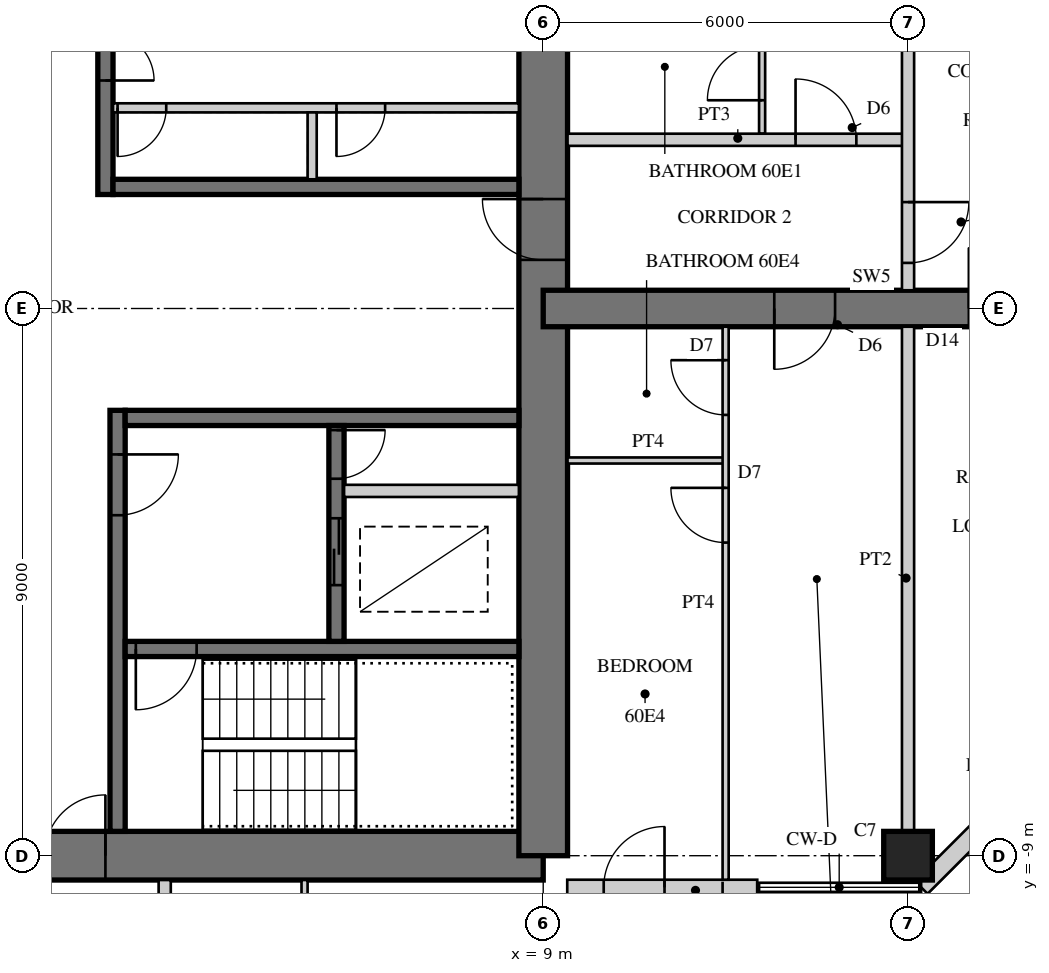
"""IFC4 building model, lengths in metres.
Left out: names, types, materials, properties, quantities, classifications, styles, units other than length and angle.
Written with IfcOpenShell. Run it as: python <this file> out.ifc"""

import sys

from ifc_helpers import new_model, si_unit, direction, frame, frame_2d, origin, origin_2d, place, context, subcontext, project, spatial, rectangle, hollow_rectangle, extrude, element, fill, save


model = new_model("IFC4")
c1 = context("Model", 3, precision=1e-05, world=origin(), true_north=direction((0.0, 1.0)))
c2 = subcontext(c1, "Body", "Model", "MODEL_VIEW")
j1 = project(units=[si_unit("LENGTHUNIT", "METRE"), si_unit("PLANEANGLEUNIT", "RADIAN")], contexts=[c1])
p1 = place(None, origin())
s1 = spatial("IfcSite", under=j1, at=p1, CompositionType="ELEMENT")
p2 = place(p1, origin())
s2 = spatial("IfcBuilding", under=s1, at=p2, CompositionType="ELEMENT")
p3 = place(p2, frame((0.0, 0.0, 235.7)))
s3 = spatial("IfcBuildingStorey", under=s2, at=p3, CompositionType="ELEMENT", Elevation=235.7)
p4 = place(p3, frame((-9.0, -9.0, 0.0), z_axis=(0.0, 0.0, 1.0), x_axis=(1.0, 0.0, 0.0)))
e1 = element("IfcWall", 1, at=p4, inside=s3, PredefinedType="SHEAR", context=c2, shape_type="SweptSolid", body=[
    extrude(rectangle(XDim=18.0, YDim=0.8, at=frame_2d((9.0, 0.0))), origin(), (0.0, 0.0, 1.0), 3.4),
])
p5 = place(p4, frame((9.8, 0.0, 0.0)))
e2 = element("IfcOpeningElement", 2, at=p5, cuts=e1, PredefinedType="OPENING", context=c2, shape_type="SweptSolid", body=[
    extrude(rectangle(XDim=1.0, YDim=2.4, at=frame_2d((0.5, 1.2))), frame((0.0, 0.41, 0.0), z_axis=(0.0, -1.0, 0.0), x_axis=(1.0, 0.0, 0.0)), (0.0, 0.0, 1.0), 0.82),
])
p6 = place(p3, frame((9.0, -9.0, 0.0), z_axis=(0.0, 0.0, 1.0), x_axis=(0.0, 1.0, 0.0)))
e3 = element("IfcWall", 3, at=p6, inside=s3, PredefinedType="SHEAR", context=c2, shape_type="SweptSolid", body=[
    extrude(rectangle(XDim=18.0, YDim=0.8, at=frame_2d((9.0, 0.0))), origin(), (0.0, 0.0, 1.0), 3.4),
])
p7 = place(p6, frame((9.8, 0.0, 0.0)))
e4 = element("IfcOpeningElement", 4, at=p7, cuts=e3, PredefinedType="OPENING", context=c2, shape_type="SweptSolid", body=[
    extrude(rectangle(XDim=1.0, YDim=2.4, at=frame_2d((0.5, 1.2))), frame((0.0, 0.41, 0.0), z_axis=(0.0, -1.0, 0.0), x_axis=(1.0, 0.0, 0.0)), (0.0, 0.0, 1.0), 0.82),
])
p8 = place(p3, frame((1.8, 1.875, 0.0), z_axis=(0.0, 0.0, 1.0), x_axis=(0.0, 1.0, 0.0)))
e5 = element("IfcWall", 5, at=p8, inside=s3, PredefinedType="SHEAR", context=c2, shape_type="SweptSolid", body=[
    extrude(rectangle(XDim=6.725, YDim=0.25, at=frame_2d((3.363, 0.0))), origin(), (0.0, 0.0, 1.0), 3.4),
])
p9 = place(p8, frame((1.875, 0.0, 0.0)))
e6 = element("IfcOpeningElement", 6, at=p9, cuts=e5, PredefinedType="OPENING", context=c2, shape_type="SweptSolid", body=[
    extrude(rectangle(XDim=1.6, YDim=2.4, at=frame_2d((0.8, 1.2))), frame((0.0, 0.135, 0.0), z_axis=(0.0, -1.0, 0.0), x_axis=(1.0, 0.0, 0.0)), (0.0, 0.0, 1.0), 0.27),
])
p10 = place(p3, frame((1.925, 2.0, 0.0), z_axis=(0.0, 0.0, 1.0), x_axis=(1.0, 0.0, 0.0)))
e7 = element("IfcWall", 7, at=p10, inside=s3, PredefinedType="SHEAR", context=c2, shape_type="SweptSolid", body=[
    extrude(rectangle(XDim=6.675, YDim=0.25, at=frame_2d((3.337, 0.0))), origin(), (0.0, 0.0, 1.0), 3.4),
])
p11 = place(p3, frame((1.925, 3.3, 0.0), z_axis=(0.0, 0.0, 1.0), x_axis=(1.0, 0.0, 0.0)))
e8 = element("IfcWall", 8, at=p11, inside=s3, PredefinedType="PARTITIONING", context=c2, shape_type="SweptSolid", body=[
    extrude(rectangle(XDim=6.675, YDim=0.15, at=frame_2d((3.337, 0.0))), origin(), (0.0, 0.0, 1.0), 3.4),
])
p12 = place(p11, frame((0.075, 0.0, 0.0)))
e9 = element("IfcOpeningElement", 9, at=p12, cuts=e8, PredefinedType="OPENING", context=c2, shape_type="SweptSolid", body=[
    extrude(rectangle(XDim=0.8, YDim=2.1, at=frame_2d((0.4, 1.05))), frame((0.0, 0.085, 0.0), z_axis=(0.0, -1.0, 0.0), x_axis=(1.0, 0.0, 0.0)), (0.0, 0.0, 1.0), 0.17),
])
p13 = place(p11, frame((3.675, 0.0, 0.0)))
e10 = element("IfcOpeningElement", 10, at=p13, cuts=e8, PredefinedType="OPENING", context=c2, shape_type="SweptSolid", body=[
    extrude(rectangle(XDim=0.8, YDim=2.1, at=frame_2d((0.4, 1.05))), frame((0.0, 0.085, 0.0), z_axis=(0.0, -1.0, 0.0), x_axis=(1.0, 0.0, 0.0)), (0.0, 0.0, 1.0), 0.17),
])
p14 = place(p3, frame((5.2, 2.125, 0.0), z_axis=(0.0, 0.0, 1.0), x_axis=(0.0, 1.0, 0.0)))
e11 = element("IfcWall", 11, at=p14, inside=s3, PredefinedType="PARTITIONING", context=c2, shape_type="SweptSolid", body=[
    extrude(rectangle(XDim=1.1, YDim=0.15, at=frame_2d((0.55, 0.0))), origin(), (0.0, 0.0, 1.0), 3.4),
])
p15 = place(p3, frame((2.0, -1.675, 0.0), z_axis=(0.0, 0.0, 1.0), x_axis=(0.0, -1.0, 0.0)))
e12 = element("IfcWall", 12, at=p15, inside=s3, PredefinedType="SHEAR", context=c2, shape_type="SweptSolid", body=[
    extrude(rectangle(XDim=6.925, YDim=0.25, at=frame_2d((3.462, 0.0))), origin(), (0.0, 0.0, 1.0), 3.4),
])
p16 = place(p15, frame((0.725, 0.0, 0.0)))
e13 = element("IfcOpeningElement", 13, at=p16, cuts=e12, PredefinedType="OPENING", context=c2, shape_type="SweptSolid", body=[
    extrude(rectangle(XDim=1.0, YDim=2.1, at=frame_2d((0.5, 1.05))), frame((0.0, 0.135, 0.0), z_axis=(0.0, -1.0, 0.0), x_axis=(1.0, 0.0, 0.0)), (0.0, 0.0, 1.0), 0.27),
])
p17 = place(p3, frame((2.125, -1.8, 0.0), z_axis=(0.0, 0.0, 1.0), x_axis=(1.0, 0.0, 0.0)))
e14 = element("IfcWall", 14, at=p17, inside=s3, PredefinedType="SHEAR", context=c2, shape_type="SweptSolid", body=[
    extrude(rectangle(XDim=6.475, YDim=0.25, at=frame_2d((3.238, 0.0))), origin(), (0.0, 0.0, 1.0), 3.4),
])
p18 = place(p3, frame((2.125, -5.6, 0.0), z_axis=(0.0, 0.0, 1.0), x_axis=(1.0, 0.0, 0.0)))
e15 = element("IfcWall", 15, at=p18, inside=s3, PredefinedType="SHEAR", context=c2, shape_type="SweptSolid", body=[
    extrude(rectangle(XDim=6.475, YDim=0.25, at=frame_2d((3.238, 0.0))), origin(), (0.0, 0.0, 1.0), 3.4),
])
p19 = place(p18, frame((0.175, 0.0, 0.0)))
e16 = element("IfcOpeningElement", 16, at=p19, cuts=e15, PredefinedType="OPENING", context=c2, shape_type="SweptSolid", body=[
    extrude(rectangle(XDim=1.0, YDim=2.1, at=frame_2d((0.5, 1.05))), frame((0.0, 0.135, 0.0), z_axis=(0.0, -1.0, 0.0), x_axis=(1.0, 0.0, 0.0)), (0.0, 0.0, 1.0), 0.27),
])
p20 = place(p3, frame((5.6, -1.925, 0.0), z_axis=(0.0, 0.0, 1.0), x_axis=(0.0, -1.0, 0.0)))
e17 = element("IfcWall", 17, at=p20, inside=s3, PredefinedType="SHEAR", context=c2, shape_type="SweptSolid", body=[
    extrude(rectangle(XDim=3.55, YDim=0.25, at=frame_2d((1.775, 0.0))), origin(), (0.0, 0.0, 1.0), 3.4),
])
p21 = place(p20, frame((1.525, 0.0, 0.0)))
e18 = element("IfcOpeningElement", 18, at=p21, cuts=e17, PredefinedType="OPENING", context=c2, shape_type="SweptSolid", body=[
    extrude(rectangle(XDim=1.1, YDim=2.2, at=frame_2d((0.55, 1.1))), frame((0.0, 0.135, 0.0), z_axis=(0.0, -1.0, 0.0), x_axis=(1.0, 0.0, 0.0)), (0.0, 0.0, 1.0), 0.27),
])
p22 = place(p20, frame((0.075, 0.0, 0.0)))
e19 = element("IfcOpeningElement", 19, at=p22, cuts=e17, PredefinedType="OPENING", context=c2, shape_type="SweptSolid", body=[
    extrude(rectangle(XDim=0.8, YDim=2.1, at=frame_2d((0.4, 1.05))), frame((0.0, 0.135, 0.0), z_axis=(0.0, -1.0, 0.0), x_axis=(1.0, 0.0, 0.0)), (0.0, 0.0, 1.0), 0.27),
])
p23 = place(p3, frame((5.725, -3.0, 0.0), z_axis=(0.0, 0.0, 1.0), x_axis=(1.0, 0.0, 0.0)))
e20 = element("IfcWall", 20, at=p23, inside=s3, PredefinedType="PARTITIONING", context=c2, shape_type="SweptSolid", body=[
    extrude(rectangle(XDim=2.875, YDim=0.2, at=frame_2d((1.438, 0.0))), origin(), (0.0, 0.0, 1.0), 3.4),
])
p24 = place(p3, frame((9.0, 0.0, 0.0), z_axis=(0.0, 0.0, 1.0), x_axis=(1.0, 0.0, 0.0)))
e21 = element("IfcWall", 21, at=p24, inside=s3, PredefinedType="SHEAR", context=c2, shape_type="SweptSolid", body=[
    extrude(rectangle(XDim=9.0, YDim=0.6, at=frame_2d((4.5, 0.0))), origin(), (0.0, 0.0, 1.0), 3.4),
])
p25 = place(p24, frame((3.8, 0.0, 0.0)))
e22 = element("IfcOpeningElement", 22, at=p25, cuts=e21, PredefinedType="OPENING", context=c2, shape_type="SweptSolid", body=[
    extrude(rectangle(XDim=1.0, YDim=2.15, at=frame_2d((0.5, 1.075))), frame((0.0, 0.31, 0.0), z_axis=(0.0, -1.0, 0.0), x_axis=(1.0, 0.0, 0.0)), (0.0, 0.0, 1.0), 0.62),
])
p26 = place(p24, frame((7.0, 0.0, 0.0)))
e23 = element("IfcOpeningElement", 23, at=p26, cuts=e21, PredefinedType="OPENING", context=c2, shape_type="SweptSolid", body=[
    extrude(rectangle(XDim=1.0, YDim=2.2, at=frame_2d((0.5, 1.1))), frame((0.0, 0.31, 0.0), z_axis=(0.0, -1.0, 0.0), x_axis=(1.0, 0.0, 0.0)), (0.0, 0.0, 1.0), 0.62),
])
p27 = place(p3, frame((15.0, -9.0, 0.0), z_axis=(0.0, 0.0, 1.0), x_axis=(1.0, 0.0, 0.0)))
e24 = element("IfcColumn", 24, at=p27, inside=s3, PredefinedType="COLUMN", context=c2, shape_type="SweptSolid", body=[
    extrude(rectangle(XDim=0.8, YDim=0.8, at=origin_2d()), origin(), (0.0, 0.0, 1.0), 3.4),
])
p28 = place(p3, frame((9.395, -9.52, 0.0), z_axis=(0.0, 0.0, 1.0), x_axis=(1.0, 0.0, 0.0)))
e25 = element("IfcWall", 25, at=p28, inside=s3, PredefinedType="SOLIDWALL", context=c2, shape_type="SweptSolid", body=[
    extrude(rectangle(XDim=3.125, YDim=0.25, at=frame_2d((1.562, 0.0))), origin(), (0.0, 0.0, 1.0), 3.22),
])
p29 = place(p28, frame((0.6, 0.0, 0.0)))
e26 = element("IfcOpeningElement", 26, at=p29, cuts=e25, PredefinedType="OPENING", context=c2, shape_type="SweptSolid", body=[
    extrude(rectangle(XDim=1.0, YDim=2.2, at=frame_2d((0.5, 1.1))), frame((0.0, 0.135, 0.0), z_axis=(0.0, -1.0, 0.0), x_axis=(1.0, 0.0, 0.0)), (0.0, 0.0, 1.0), 0.27),
])
p30 = place(p3, frame((15.215, -9.52, 0.0), z_axis=(0.0, 0.0, 1.0), x_axis=(0.707106781187, 0.707106781187, 0.0)))
e27 = element("IfcWall", 27, at=p30, inside=s3, PredefinedType="SOLIDWALL", context=c2, shape_type="SweptSolid", body=[
    extrude(rectangle(XDim=4.674, YDim=0.3, at=frame_2d((2.337, 0.0))), origin(), (0.0, 0.0, 1.0), 3.22),
])
p31 = place(p30, frame((1.887, 0.0, 0.3)))
e28 = element("IfcOpeningElement", 28, at=p31, cuts=e27, PredefinedType="OPENING", context=c2, shape_type="SweptSolid", body=[
    extrude(rectangle(XDim=0.9, YDim=2.4, at=frame_2d((0.45, 1.2))), frame((0.0, 0.16, 0.0), z_axis=(0.0, -1.0, 0.0), x_axis=(1.0, 0.0, 0.0)), (0.0, 0.0, 1.0), 0.32),
])
p32 = place(p3, frame((12.6, 2.875, 0.0), z_axis=(0.0, 0.0, 1.0), x_axis=(0.0, 1.0, 0.0)))
e29 = element("IfcWall", 29, at=p32, inside=s3, PredefinedType="PARTITIONING", context=c2, shape_type="SweptSolid", body=[
    extrude(rectangle(XDim=6.605, YDim=0.1, at=frame_2d((3.302, 0.0))), origin(), (0.0, 0.0, 1.0), 3.22),
])
p33 = place(p32, frame((0.55, 0.0, 0.0)))
e30 = element("IfcOpeningElement", 30, at=p33, cuts=e29, PredefinedType="OPENING", context=c2, shape_type="SweptSolid", body=[
    extrude(rectangle(XDim=0.9, YDim=2.1, at=frame_2d((0.45, 1.05))), frame((0.0, 0.06, 0.0), z_axis=(0.0, -1.0, 0.0), x_axis=(1.0, 0.0, 0.0)), (0.0, 0.0, 1.0), 0.12),
])
p34 = place(p32, frame((2.65, 0.0, 0.0)))
e31 = element("IfcOpeningElement", 31, at=p34, cuts=e29, PredefinedType="OPENING", context=c2, shape_type="SweptSolid", body=[
    extrude(rectangle(XDim=0.9, YDim=2.1, at=frame_2d((0.45, 1.05))), frame((0.0, 0.06, 0.0), z_axis=(0.0, -1.0, 0.0), x_axis=(1.0, 0.0, 0.0)), (0.0, 0.0, 1.0), 0.12),
])
p35 = place(p3, frame((9.4, -2.5, 0.0), z_axis=(0.0, 0.0, 1.0), x_axis=(1.0, 0.0, 0.0)))
e32 = element("IfcWall", 32, at=p35, inside=s3, PredefinedType="PARTITIONING", context=c2, shape_type="SweptSolid", body=[
    extrude(rectangle(XDim=2.65, YDim=0.1, at=frame_2d((1.325, 0.0))), origin(), (0.0, 0.0, 1.0), 3.22),
])
p36 = place(p3, frame((12.0, -9.395, 0.0), z_axis=(0.0, 0.0, 1.0), x_axis=(0.0, 1.0, 0.0)))
e33 = element("IfcWall", 33, at=p36, inside=s3, PredefinedType="PARTITIONING", context=c2, shape_type="SweptSolid", body=[
    extrude(rectangle(XDim=9.095, YDim=0.1, at=frame_2d((4.547, 0.0))), origin(), (0.0, 0.0, 1.0), 3.22),
])
p37 = place(p36, frame((5.545, 0.0, 0.0)))
e34 = element("IfcOpeningElement", 34, at=p37, cuts=e33, PredefinedType="OPENING", context=c2, shape_type="SweptSolid", body=[
    extrude(rectangle(XDim=0.9, YDim=2.1, at=frame_2d((0.45, 1.05))), frame((0.0, 0.06, 0.0), z_axis=(0.0, -1.0, 0.0), x_axis=(1.0, 0.0, 0.0)), (0.0, 0.0, 1.0), 0.12),
])
p38 = place(p36, frame((7.645, 0.0, 0.0)))
e35 = element("IfcOpeningElement", 35, at=p38, cuts=e33, PredefinedType="OPENING", context=c2, shape_type="SweptSolid", body=[
    extrude(rectangle(XDim=0.9, YDim=2.1, at=frame_2d((0.45, 1.05))), frame((0.0, 0.06, 0.0), z_axis=(0.0, -1.0, 0.0), x_axis=(1.0, 0.0, 0.0)), (0.0, 0.0, 1.0), 0.12),
])
p39 = place(p3, frame((9.4, 2.775, 0.0), z_axis=(0.0, 0.0, 1.0), x_axis=(1.0, 0.0, 0.0)))
e36 = element("IfcWall", 36, at=p39, inside=s3, PredefinedType="SOLIDWALL", context=c2, shape_type="SweptSolid", body=[
    extrude(rectangle(XDim=5.6, YDim=0.2, at=frame_2d((2.8, 0.0))), origin(), (0.0, 0.0, 1.0), 3.22),
])
p40 = place(p39, frame((3.75, 0.0, 0.0)))
e37 = element("IfcOpeningElement", 37, at=p40, cuts=e36, PredefinedType="OPENING", context=c2, shape_type="SweptSolid", body=[
    extrude(rectangle(XDim=1.0, YDim=2.15, at=frame_2d((0.5, 1.075))), frame((0.0, 0.11, 0.0), z_axis=(0.0, -1.0, 0.0), x_axis=(1.0, 0.0, 0.0)), (0.0, 0.0, 1.0), 0.22),
])
p41 = place(p3, frame((15.0, -8.6, 0.0), z_axis=(0.0, 0.0, 1.0), x_axis=(0.0, 1.0, 0.0)))
e38 = element("IfcWall", 38, at=p41, inside=s3, PredefinedType="SOLIDWALL", context=c2, shape_type="SweptSolid", body=[
    extrude(rectangle(XDim=8.3, YDim=0.2, at=frame_2d((4.15, 0.0))), origin(), (0.0, 0.0, 1.0), 2.52),
])
p42 = place(p3, frame((15.0, 0.3, 0.0), z_axis=(0.0, 0.0, 1.0), x_axis=(0.0, 1.0, 0.0)))
e39 = element("IfcWall", 39, at=p42, inside=s3, PredefinedType="SOLIDWALL", context=c2, shape_type="SweptSolid", body=[
    extrude(rectangle(XDim=8.3, YDim=0.2, at=frame_2d((4.15, 0.0))), origin(), (0.0, 0.0, 1.0), 2.52),
])
p43 = place(p42, frame((0.45, 0.0, 0.0)))
e40 = element("IfcOpeningElement", 40, at=p43, cuts=e39, PredefinedType="OPENING", context=c2, shape_type="SweptSolid", body=[
    extrude(rectangle(XDim=1.0, YDim=2.2, at=frame_2d((0.5, 1.1))), frame((0.0, 0.11, 0.0), z_axis=(0.0, -1.0, 0.0), x_axis=(1.0, 0.0, 0.0)), (0.0, 0.0, 1.0), 0.22),
])
p44 = place(p3, frame((5.075, -9.4, 0.0), z_axis=(0.0, 0.0, 1.0), x_axis=(0.0, -1.0, 0.0)))
e41 = element("IfcWall", 41, at=p44, inside=s3, PredefinedType="PARTITIONING", context=c2, shape_type="SweptSolid", body=[
    extrude(rectangle(XDim=3.25, YDim=0.1, at=frame_2d((1.625, 0.0))), origin(), (0.0, 0.0, 1.0), 3.22),
])
p45 = place(p3, frame((2.775, -9.4, 0.0), z_axis=(0.0, 0.0, 1.0), x_axis=(0.0, -1.0, 0.0)))
e42 = element("IfcWall", 42, at=p45, inside=s3, PredefinedType="SOLIDWALL", context=c2, shape_type="SweptSolid", body=[
    extrude(rectangle(XDim=5.6, YDim=0.2, at=frame_2d((2.8, 0.0))), origin(), (0.0, 0.0, 1.0), 3.22),
])
p46 = place(p45, frame((3.75, 0.0, 0.0)))
e43 = element("IfcOpeningElement", 43, at=p46, cuts=e42, PredefinedType="OPENING", context=c2, shape_type="SweptSolid", body=[
    extrude(rectangle(XDim=1.0, YDim=2.15, at=frame_2d((0.5, 1.075))), frame((0.0, 0.11, 0.0), z_axis=(0.0, -1.0, 0.0), x_axis=(1.0, 0.0, 0.0)), (0.0, 0.0, 1.0), 0.22),
])
p47 = place(p29, origin())
e44 = element("IfcDoor", 44, at=p47, inside=s3, OperationType="SINGLE_SWING_RIGHT", PredefinedType="DOOR", context=c2, shape_type="SweptSolid", body=[
    extrude(hollow_rectangle(XDim=1.0, YDim=2.2, WallThickness=0.06, at=frame_2d((0.5, 1.1))), frame((0.0, 0.025, 0.0), z_axis=(0.0, -1.0, 0.0), x_axis=(1.0, 0.0, 0.0)), (0.0, 0.0, 1.0), 0.05),
    extrude(rectangle(XDim=0.879, YDim=2.079, at=frame_2d((0.5, 1.1))), frame((0.0, 0.025, 0.0), z_axis=(0.0, -1.0, 0.0), x_axis=(1.0, 0.0, 0.0)), (0.0, 0.0, 1.0), 0.05),
])
fill(e26, e44)
p48 = place(p33, origin())
e45 = element("IfcDoor", 45, at=p48, inside=s3, OperationType="SINGLE_SWING_LEFT", PredefinedType="DOOR", context=c2, shape_type="SweptSolid", body=[
    extrude(rectangle(XDim=0.9, YDim=2.1, at=frame_2d((0.45, 1.05))), frame((0.0, 0.025, 0.0), z_axis=(0.0, -1.0, 0.0), x_axis=(1.0, 0.0, 0.0)), (0.0, 0.0, 1.0), 0.05),
])
fill(e30, e45)
p49 = place(p37, origin())
e46 = element("IfcDoor", 46, at=p49, inside=s3, OperationType="SINGLE_SWING_RIGHT", PredefinedType="DOOR", context=c2, shape_type="SweptSolid", body=[
    extrude(rectangle(XDim=0.9, YDim=2.1, at=frame_2d((0.45, 1.05))), frame((0.0, 0.025, 0.0), z_axis=(0.0, -1.0, 0.0), x_axis=(1.0, 0.0, 0.0)), (0.0, 0.0, 1.0), 0.05),
])
fill(e34, e46)
p50 = place(p38, origin())
e47 = element("IfcDoor", 47, at=p50, inside=s3, OperationType="SINGLE_SWING_RIGHT", PredefinedType="DOOR", context=c2, shape_type="SweptSolid", body=[
    extrude(rectangle(XDim=0.9, YDim=2.1, at=frame_2d((0.45, 1.05))), frame((0.0, 0.025, 0.0), z_axis=(0.0, -1.0, 0.0), x_axis=(1.0, 0.0, 0.0)), (0.0, 0.0, 1.0), 0.05),
])
fill(e35, e47)
p51 = place(p40, origin())
e48 = element("IfcDoor", 48, at=p51, inside=s3, OperationType="SINGLE_SWING_LEFT", PredefinedType="DOOR", context=c2, shape_type="SweptSolid", body=[
    extrude(rectangle(XDim=1.0, YDim=2.15, at=frame_2d((0.5, 1.075))), frame((0.0, 0.025, 0.0), z_axis=(0.0, -1.0, 0.0), x_axis=(1.0, 0.0, 0.0)), (0.0, 0.0, 1.0), 0.05),
])
fill(e37, e48)
p52 = place(p43, frame((1.0, 0.0, 0.0), z_axis=(0.0, 0.0, 1.0), x_axis=(-1.0, 0.0, 0.0)))
e49 = element("IfcDoor", 49, at=p52, inside=s3, OperationType="SINGLE_SWING_LEFT", PredefinedType="DOOR", context=c2, shape_type="SweptSolid", body=[
    extrude(rectangle(XDim=1.0, YDim=2.2, at=frame_2d((0.5, 1.1))), frame((0.0, 0.025, 0.0), z_axis=(0.0, -1.0, 0.0), x_axis=(1.0, 0.0, 0.0)), (0.0, 0.0, 1.0), 0.05),
])
fill(e40, e49)
p53 = place(p25, frame((1.0, 0.0, 0.0), z_axis=(0.0, 0.0, 1.0), x_axis=(-1.0, 0.0, 0.0)))
e50 = element("IfcDoor", 50, at=p53, inside=s3, OperationType="SINGLE_SWING_RIGHT", PredefinedType="DOOR", context=c2, shape_type="SweptSolid", body=[
    extrude(rectangle(XDim=1.0, YDim=2.15, at=frame_2d((0.5, 1.075))), frame((0.0, 0.025, 0.0), z_axis=(0.0, -1.0, 0.0), x_axis=(1.0, 0.0, 0.0)), (0.0, 0.0, 1.0), 0.05),
])
fill(e22, e50)
p54 = place(p5, origin())
e51 = element("IfcDoor", 51, at=p54, inside=s3, OperationType="SINGLE_SWING_RIGHT", PredefinedType="DOOR", context=c2, shape_type="SweptSolid", body=[
    extrude(rectangle(XDim=1.0, YDim=2.4, at=frame_2d((0.5, 1.2))), frame((0.0, 0.055, 0.0), z_axis=(0.0, -1.0, 0.0), x_axis=(1.0, 0.0, 0.0)), (0.0, 0.0, 1.0), 0.05),
])
fill(e2, e51)
p55 = place(p7, origin())
e52 = element("IfcDoor", 52, at=p55, inside=s3, OperationType="SINGLE_SWING_RIGHT", PredefinedType="DOOR", context=c2, shape_type="SweptSolid", body=[
    extrude(rectangle(XDim=1.0, YDim=2.4, at=frame_2d((0.5, 1.2))), frame((0.0, 0.055, 0.0), z_axis=(0.0, -1.0, 0.0), x_axis=(1.0, 0.0, 0.0)), (0.0, 0.0, 1.0), 0.05),
])
fill(e4, e52)
p56 = place(p9, frame((1.6, 0.0, 0.0), z_axis=(0.0, 0.0, 1.0), x_axis=(-1.0, 0.0, 0.0)))
e53 = element("IfcDoor", 53, at=p56, inside=s3, OperationType="DOUBLE_DOOR_SINGLE_SWING", PredefinedType="DOOR", context=c2, shape_type="SweptSolid", body=[
    extrude(rectangle(XDim=1.6, YDim=2.4, at=frame_2d((0.8, 1.2))), frame((0.0, 0.025, 0.0), z_axis=(0.0, -1.0, 0.0), x_axis=(1.0, 0.0, 0.0)), (0.0, 0.0, 1.0), 0.05),
])
fill(e6, e53)
p57 = place(p12, frame((0.8, 0.0, 0.0), z_axis=(0.0, 0.0, 1.0), x_axis=(-1.0, 0.0, 0.0)))
e54 = element("IfcDoor", 54, at=p57, inside=s3, OperationType="SINGLE_SWING_RIGHT", PredefinedType="DOOR", context=c2, shape_type="SweptSolid", body=[
    extrude(rectangle(XDim=0.8, YDim=2.1, at=frame_2d((0.4, 1.05))), frame((0.0, 0.025, 0.0), z_axis=(0.0, -1.0, 0.0), x_axis=(1.0, 0.0, 0.0)), (0.0, 0.0, 1.0), 0.05),
])
fill(e9, e54)
p58 = place(p13, frame((0.8, 0.0, 0.0), z_axis=(0.0, 0.0, 1.0), x_axis=(-1.0, 0.0, 0.0)))
e55 = element("IfcDoor", 55, at=p58, inside=s3, OperationType="SINGLE_SWING_RIGHT", PredefinedType="DOOR", context=c2, shape_type="SweptSolid", body=[
    extrude(rectangle(XDim=0.8, YDim=2.1, at=frame_2d((0.4, 1.05))), frame((0.0, 0.025, 0.0), z_axis=(0.0, -1.0, 0.0), x_axis=(1.0, 0.0, 0.0)), (0.0, 0.0, 1.0), 0.05),
])
fill(e10, e55)
p59 = place(p16, origin())
e56 = element("IfcDoor", 56, at=p59, inside=s3, OperationType="SINGLE_SWING_LEFT", PredefinedType="DOOR", context=c2, shape_type="SweptSolid", body=[
    extrude(rectangle(XDim=1.0, YDim=2.1, at=frame_2d((0.5, 1.05))), frame((0.0, 0.025, 0.0), z_axis=(0.0, -1.0, 0.0), x_axis=(1.0, 0.0, 0.0)), (0.0, 0.0, 1.0), 0.05),
])
fill(e13, e56)
p60 = place(p19, frame((1.0, 0.0, 0.0), z_axis=(0.0, 0.0, 1.0), x_axis=(-1.0, 0.0, 0.0)))
e57 = element("IfcDoor", 57, at=p60, inside=s3, OperationType="SINGLE_SWING_RIGHT", PredefinedType="DOOR", context=c2, shape_type="SweptSolid", body=[
    extrude(rectangle(XDim=1.0, YDim=2.1, at=frame_2d((0.5, 1.05))), frame((0.0, 0.025, 0.0), z_axis=(0.0, -1.0, 0.0), x_axis=(1.0, 0.0, 0.0)), (0.0, 0.0, 1.0), 0.05),
])
fill(e16, e57)
p61 = place(p21, origin())
e58 = element("IfcDoor", 58, at=p61, inside=s3, OperationType="DOUBLE_DOOR_SLIDING", PredefinedType="DOOR", context=c2, shape_type="SweptSolid", body=[
    extrude(rectangle(XDim=1.1, YDim=2.2, at=frame_2d((0.55, 1.1))), frame((0.0, 0.025, 0.0), z_axis=(0.0, -1.0, 0.0), x_axis=(1.0, 0.0, 0.0)), (0.0, 0.0, 1.0), 0.05),
])
fill(e18, e58)
p62 = place(p22, origin())
e59 = element("IfcDoor", 59, at=p62, inside=s3, OperationType="SINGLE_SWING_LEFT", PredefinedType="DOOR", context=c2, shape_type="SweptSolid", body=[
    extrude(rectangle(XDim=0.8, YDim=2.1, at=frame_2d((0.4, 1.05))), frame((0.0, 0.025, 0.0), z_axis=(0.0, -1.0, 0.0), x_axis=(1.0, 0.0, 0.0)), (0.0, 0.0, 1.0), 0.05),
])
fill(e19, e59)
save(model, sys.argv[1])
